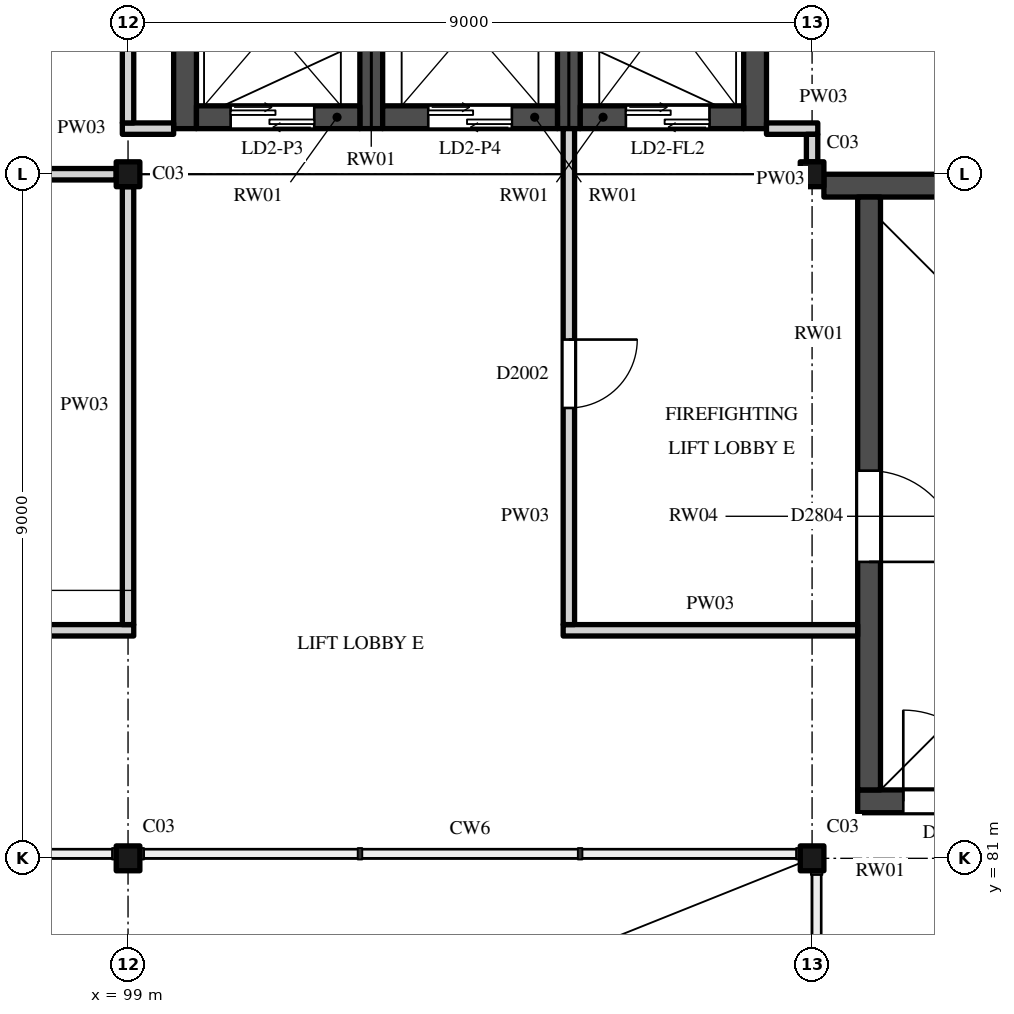
"""IFC4 building model, lengths in metres.
Left out: names, types, materials, properties, quantities, classifications, styles, units other than length and angle.
Written with IfcOpenShell. Run it as: python <this file> out.ifc"""

import sys

from ifc_helpers import new_model, si_unit, direction, frame, frame_2d, origin, origin_2d, place, context, subcontext, project, spatial, rectangle, i_section, extrude, element, fill, save


model = new_model("IFC4")
c1 = context("Model", 3, precision=1e-05, world=origin(), true_north=direction((0.0, 1.0)))
c2 = subcontext(c1, "Body", "Model", "MODEL_VIEW")
j1 = project(units=[si_unit("LENGTHUNIT", "METRE"), si_unit("PLANEANGLEUNIT", "RADIAN")], contexts=[c1])
p1 = place(None, origin())
s1 = spatial("IfcSite", under=j1, at=p1, CompositionType="ELEMENT")
p2 = place(p1, origin())
s2 = spatial("IfcBuilding", under=s1, at=p2, CompositionType="ELEMENT")
p3 = place(p2, frame((0.0, 0.0, 11.0)))
s3 = spatial("IfcBuildingStorey", under=s2, at=p3, CompositionType="ELEMENT", Elevation=11.0)
for number, where, z_axis, x_axis in (
    (1, (99.0, 81.0, 0.0), (0.0, 0.0, 1.0), (1.0, 0.0, 0.0)),
    (2, (108.0, 81.0, 0.0), (0.0, 0.0, 1.0), (1.0, 0.0, 0.0)),
    (3, (99.0, 90.0, 0.0), (0.0, 0.0, 1.0), (1.0, 0.0, 0.0)),
    (4, (108.0, 90.0, 0.0), (0.0, 0.0, 1.0), (1.0, 0.0, 0.0)),
):
    element("IfcColumn", number, at=place(p3, frame(where, z_axis=z_axis, x_axis=x_axis)), inside=s3, PredefinedType="COLUMN", context=c2, shape_type="SweptSolid", body=[
        extrude(i_section(OverallWidth=0.311, OverallDepth=0.327, WebThickness=0.016, FlangeThickness=0.025, FilletRadius=0.017, at=origin_2d()), origin(), (0.0, 0.0, 1.0), 5.0),
    ])
p4 = place(p3, frame((108.6, 81.75, 0.0), z_axis=(0.0, 0.0, 1.0), x_axis=(1.0, 0.0, 0.0)))
e5 = element("IfcWall", 5, at=p4, inside=s3, PredefinedType="SHEAR", context=c2, shape_type="SweptSolid", body=[
    extrude(rectangle(XDim=8.1, YDim=0.3, at=frame_2d((4.05, 0.0))), origin(), (0.0, 0.0, 1.0), 5.0),
])
p5 = place(p4, frame((0.6, 0.0, 0.0)))
e6 = element("IfcOpeningElement", 6, at=p5, cuts=e5, PredefinedType="OPENING", context=c2, shape_type="SweptSolid", body=[
    extrude(rectangle(XDim=1.2, YDim=2.1, at=frame_2d((0.6, 1.05))), frame((0.0, 0.16, 0.0), z_axis=(0.0, -1.0, 0.0), x_axis=(1.0, 0.0, 0.0)), (0.0, 0.0, 1.0), 0.32),
])
p6 = place(p3, frame((108.156, 89.85, 0.0), z_axis=(0.0, 0.0, 1.0), x_axis=(1.0, 0.0, 0.0)))
e7 = element("IfcWall", 7, at=p6, inside=s3, PredefinedType="SHEAR", context=c2, shape_type="SweptSolid", body=[
    extrude(rectangle(XDim=8.544, YDim=0.3, at=frame_2d((4.272, 0.0))), origin(), (0.0, 0.0, 1.0), 5.0),
])
p7 = place(p3, frame((108.75, 81.9, 0.0), z_axis=(0.0, 0.0, 1.0), x_axis=(0.0, 1.0, 0.0)))
e8 = element("IfcWall", 8, at=p7, inside=s3, PredefinedType="SHEAR", context=c2, shape_type="SweptSolid", body=[
    extrude(rectangle(XDim=7.8, YDim=0.3, at=frame_2d((3.9, 0.0))), origin(), (0.0, 0.0, 1.0), 5.0),
])
p8 = place(p7, frame((3.0, 0.0, 0.0)))
e9 = element("IfcOpeningElement", 9, at=p8, cuts=e8, PredefinedType="OPENING", context=c2, shape_type="SweptSolid", body=[
    extrude(rectangle(XDim=1.2, YDim=2.1, at=frame_2d((0.6, 1.05))), frame((0.0, 0.16, 0.0), z_axis=(0.0, -1.0, 0.0), x_axis=(1.0, 0.0, 0.0)), (0.0, 0.0, 1.0), 0.32),
])
for number, where, z_axis, x_axis in (
    (10, (99.75, 90.6, 0.0), (0.0, 0.0, 1.0), (0.0, 1.0, 0.0)),
    (11, (102.2, 90.6, 0.0), (0.0, 0.0, 1.0), (0.0, 1.0, 0.0)),
    (12, (104.8, 90.6, 0.0), (0.0, 0.0, 1.0), (0.0, 1.0, 0.0)),
    (13, (107.25, 90.6, 0.0), (0.0, 0.0, 1.0), (0.0, 1.0, 0.0)),
):
    element("IfcWall", number, at=place(p3, frame(where, z_axis=z_axis, x_axis=x_axis)), inside=s3, PredefinedType="SHEAR", context=c2, shape_type="SweptSolid", body=[
        extrude(rectangle(XDim=3.6, YDim=0.3, at=frame_2d((1.8, 0.0))), origin(), (0.0, 0.0, 1.0), 5.0),
    ])
p9 = place(p3, frame((99.9, 90.75, 0.0), z_axis=(0.0, 0.0, 1.0), x_axis=(1.0, 0.0, 0.0)))
e14 = element("IfcWall", 14, at=p9, inside=s3, PredefinedType="SHEAR", context=c2, shape_type="SweptSolid", body=[
    extrude(rectangle(XDim=2.15, YDim=0.3, at=frame_2d((1.075, 0.0))), origin(), (0.0, 0.0, 1.0), 5.0),
])
p10 = place(p9, frame((0.45, 0.0, 0.0)))
e15 = element("IfcOpeningElement", 15, at=p10, cuts=e14, PredefinedType="OPENING", context=c2, shape_type="SweptSolid", body=[
    extrude(rectangle(XDim=1.1, YDim=2.1, at=frame_2d((0.55, 1.05))), frame((0.0, 0.16, 0.0), z_axis=(0.0, -1.0, 0.0), x_axis=(1.0, 0.0, 0.0)), (0.0, 0.0, 1.0), 0.32),
])
p11 = place(p3, frame((102.35, 90.75, 0.0), z_axis=(0.0, 0.0, 1.0), x_axis=(1.0, 0.0, 0.0)))
e16 = element("IfcWall", 16, at=p11, inside=s3, PredefinedType="SHEAR", context=c2, shape_type="SweptSolid", body=[
    extrude(rectangle(XDim=2.3, YDim=0.3, at=frame_2d((1.15, 0.0))), origin(), (0.0, 0.0, 1.0), 5.0),
])
p12 = place(p11, frame((0.6, 0.0, 0.0)))
e17 = element("IfcOpeningElement", 17, at=p12, cuts=e16, PredefinedType="OPENING", context=c2, shape_type="SweptSolid", body=[
    extrude(rectangle(XDim=1.1, YDim=2.1, at=frame_2d((0.55, 1.05))), frame((0.0, 0.16, 0.0), z_axis=(0.0, -1.0, 0.0), x_axis=(1.0, 0.0, 0.0)), (0.0, 0.0, 1.0), 0.32),
])
p13 = place(p3, frame((104.95, 90.75, 0.0), z_axis=(0.0, 0.0, 1.0), x_axis=(1.0, 0.0, 0.0)))
e18 = element("IfcWall", 18, at=p13, inside=s3, PredefinedType="SHEAR", context=c2, shape_type="SweptSolid", body=[
    extrude(rectangle(XDim=2.15, YDim=0.3, at=frame_2d((1.075, 0.0))), origin(), (0.0, 0.0, 1.0), 5.0),
])
p14 = place(p13, frame((0.6, 0.0, 0.0)))
e19 = element("IfcOpeningElement", 19, at=p14, cuts=e18, PredefinedType="OPENING", context=c2, shape_type="SweptSolid", body=[
    extrude(rectangle(XDim=1.1, YDim=2.1, at=frame_2d((0.55, 1.05))), frame((0.0, 0.16, 0.0), z_axis=(0.0, -1.0, 0.0), x_axis=(1.0, 0.0, 0.0)), (0.0, 0.0, 1.0), 0.32),
])
p15 = place(p3, frame((71.925, 84.0, 0.0), z_axis=(0.0, 0.0, 1.0), x_axis=(1.0, 0.0, 0.0)))
e20 = element("IfcWall", 20, at=p15, inside=s3, PredefinedType="PARTITIONING", context=c2, shape_type="SweptSolid", body=[
    extrude(rectangle(XDim=27.15, YDim=0.15, at=frame_2d((13.575, 0.0))), origin(), (0.0, 0.0, 1.0), 4.469),
])
p16 = place(p15, frame((12.625, 0.0, 0.0)))
e21 = element("IfcOpeningElement", 21, at=p16, cuts=e20, PredefinedType="OPENING", context=c2, shape_type="SweptSolid", body=[
    extrude(rectangle(XDim=1.8, YDim=2.4, at=frame_2d((0.9, 1.2))), frame((0.0, 0.085, 0.0), z_axis=(0.0, -1.0, 0.0), x_axis=(1.0, 0.0, 0.0)), (0.0, 0.0, 1.0), 0.17),
])
p17 = place(p3, frame((104.725, 84.0, 0.0), z_axis=(0.0, 0.0, 1.0), x_axis=(1.0, 0.0, 0.0)))
e22 = element("IfcWall", 22, at=p17, inside=s3, PredefinedType="PARTITIONING", context=c2, shape_type="SweptSolid", body=[
    extrude(rectangle(XDim=3.875, YDim=0.15, at=frame_2d((1.938, 0.0))), origin(), (0.0, 0.0, 1.0), 4.469),
])
p18 = place(p3, frame((90.156, 90.0, 0.0), z_axis=(0.0, 0.0, 1.0), x_axis=(1.0, 0.0, 0.0)))
e23 = element("IfcWall", 23, at=p18, inside=s3, PredefinedType="PARTITIONING", context=c2, shape_type="SweptSolid", body=[
    extrude(rectangle(XDim=8.689, YDim=0.15, at=frame_2d((4.344, 0.0))), origin(), (0.0, 0.0, 1.0), 4.469),
])
for number, where, z_axis, x_axis in (
    (24, (98.925, 90.6, 0.0), (0.0, 0.0, 1.0), (1.0, 0.0, 0.0)),
    (25, (107.4, 90.6, 0.0), (0.0, 0.0, 1.0), (1.0, 0.0, 0.0)),
):
    element("IfcWall", number, at=place(p3, frame(where, z_axis=z_axis, x_axis=x_axis)), inside=s3, PredefinedType="PARTITIONING", context=c2, shape_type="SweptSolid", body=[
        extrude(rectangle(XDim=0.675, YDim=0.15, at=frame_2d((0.337, 0.0))), origin(), (0.0, 0.0, 1.0), 4.825),
    ])
p19 = place(p3, frame((99.0, 84.075, 0.0), z_axis=(0.0, 0.0, 1.0), x_axis=(0.0, 1.0, 0.0)))
e26 = element("IfcWall", 26, at=p19, inside=s3, PredefinedType="PARTITIONING", context=c2, shape_type="SweptSolid", body=[
    extrude(rectangle(XDim=5.761, YDim=0.15, at=frame_2d((2.881, 0.0))), origin(), (0.0, 0.0, 1.0), 4.371),
])
p20 = place(p3, frame((99.0, 90.675, 0.0), z_axis=(0.0, 0.0, 1.0), x_axis=(0.0, 1.0, 0.0)))
e27 = element("IfcWall", 27, at=p20, inside=s3, PredefinedType="PARTITIONING", context=c2, shape_type="SweptSolid", body=[
    extrude(rectangle(XDim=8.168, YDim=0.15, at=frame_2d((4.084, 0.0))), origin(), (0.0, 0.0, 1.0), 4.371),
])
p21 = place(p3, frame((104.8, 84.075, 0.0), z_axis=(0.0, 0.0, 1.0), x_axis=(0.0, 1.0, 0.0)))
e28 = element("IfcWall", 28, at=p21, inside=s3, PredefinedType="PARTITIONING", context=c2, shape_type="SweptSolid", body=[
    extrude(rectangle(XDim=6.525, YDim=0.15, at=frame_2d((3.263, 0.0))), origin(), (0.0, 0.0, 1.0), 4.825),
])
p22 = place(p21, frame((2.85, 0.0, 0.0)))
e29 = element("IfcOpeningElement", 29, at=p22, cuts=e28, PredefinedType="OPENING", context=c2, shape_type="SweptSolid", body=[
    extrude(rectangle(XDim=0.9, YDim=2.1, at=frame_2d((0.45, 1.05))), frame((0.0, 0.085, 0.0), z_axis=(0.0, -1.0, 0.0), x_axis=(1.0, 0.0, 0.0)), (0.0, 0.0, 1.0), 0.17),
])
p23 = place(p3, frame((108.0, 90.164, 0.0), z_axis=(0.0, 0.0, 1.0), x_axis=(0.0, 1.0, 0.0)))
e30 = element("IfcWall", 30, at=p23, inside=s3, PredefinedType="PARTITIONING", context=c2, shape_type="SweptSolid", body=[
    extrude(rectangle(XDim=0.361, YDim=0.15, at=frame_2d((0.181, 0.0))), origin(), (0.0, 0.0, 1.0), 4.825),
])
p24 = place(p8, origin())
e31 = element("IfcDoor", 31, at=p24, inside=s3, OperationType="SINGLE_SWING_LEFT", PredefinedType="DOOR", context=c2, shape_type="SweptSolid", body=[
    extrude(rectangle(XDim=1.2, YDim=2.1, at=frame_2d((0.6, 1.05))), frame((0.0, 0.025, 0.0), z_axis=(0.0, -1.0, 0.0), x_axis=(1.0, 0.0, 0.0)), (0.0, 0.0, 1.0), 0.05),
])
fill(e9, e31)
p25 = place(p5, origin())
e32 = element("IfcDoor", 32, at=p25, inside=s3, OperationType="SINGLE_SWING_RIGHT", PredefinedType="DOOR", context=c2, shape_type="SweptSolid", body=[
    extrude(rectangle(XDim=1.2, YDim=2.1, at=frame_2d((0.6, 1.05))), frame((0.0, 0.025, 0.0), z_axis=(0.0, -1.0, 0.0), x_axis=(1.0, 0.0, 0.0)), (0.0, 0.0, 1.0), 0.05),
])
fill(e6, e32)
p26 = place(p10, origin())
e33 = element("IfcDoor", 33, at=p26, inside=s3, OperationType="DOUBLE_DOOR_SLIDING", PredefinedType="DOOR", context=c2, shape_type="SweptSolid", body=[
    extrude(rectangle(XDim=1.1, YDim=2.1, at=frame_2d((0.55, 1.05))), frame((0.0, 0.025, 0.0), z_axis=(0.0, -1.0, 0.0), x_axis=(1.0, 0.0, 0.0)), (0.0, 0.0, 1.0), 0.05),
])
fill(e15, e33)
p27 = place(p12, origin())
e34 = element("IfcDoor", 34, at=p27, inside=s3, OperationType="DOUBLE_DOOR_SLIDING", PredefinedType="DOOR", context=c2, shape_type="SweptSolid", body=[
    extrude(rectangle(XDim=1.1, YDim=2.1, at=frame_2d((0.55, 1.05))), frame((0.0, 0.025, 0.0), z_axis=(0.0, -1.0, 0.0), x_axis=(1.0, 0.0, 0.0)), (0.0, 0.0, 1.0), 0.05),
])
fill(e17, e34)
p28 = place(p14, origin())
e35 = element("IfcDoor", 35, at=p28, inside=s3, OperationType="DOUBLE_DOOR_SLIDING", PredefinedType="DOOR", context=c2, shape_type="SweptSolid", body=[
    extrude(rectangle(XDim=1.1, YDim=2.1, at=frame_2d((0.55, 1.05))), frame((0.0, 0.025, 0.0), z_axis=(0.0, -1.0, 0.0), x_axis=(1.0, 0.0, 0.0)), (0.0, 0.0, 1.0), 0.05),
])
fill(e19, e35)
p29 = place(p22, origin())
e36 = element("IfcDoor", 36, at=p29, inside=s3, OperationType="SINGLE_SWING_RIGHT", PredefinedType="DOOR", context=c2, shape_type="SweptSolid", body=[
    extrude(rectangle(XDim=0.9, YDim=2.1, at=frame_2d((0.45, 1.05))), frame((0.0, 0.025, 0.0), z_axis=(0.0, -1.0, 0.0), x_axis=(1.0, 0.0, 0.0)), (0.0, 0.0, 1.0), 0.05),
])
fill(e29, e36)
save(model, sys.argv[1])
